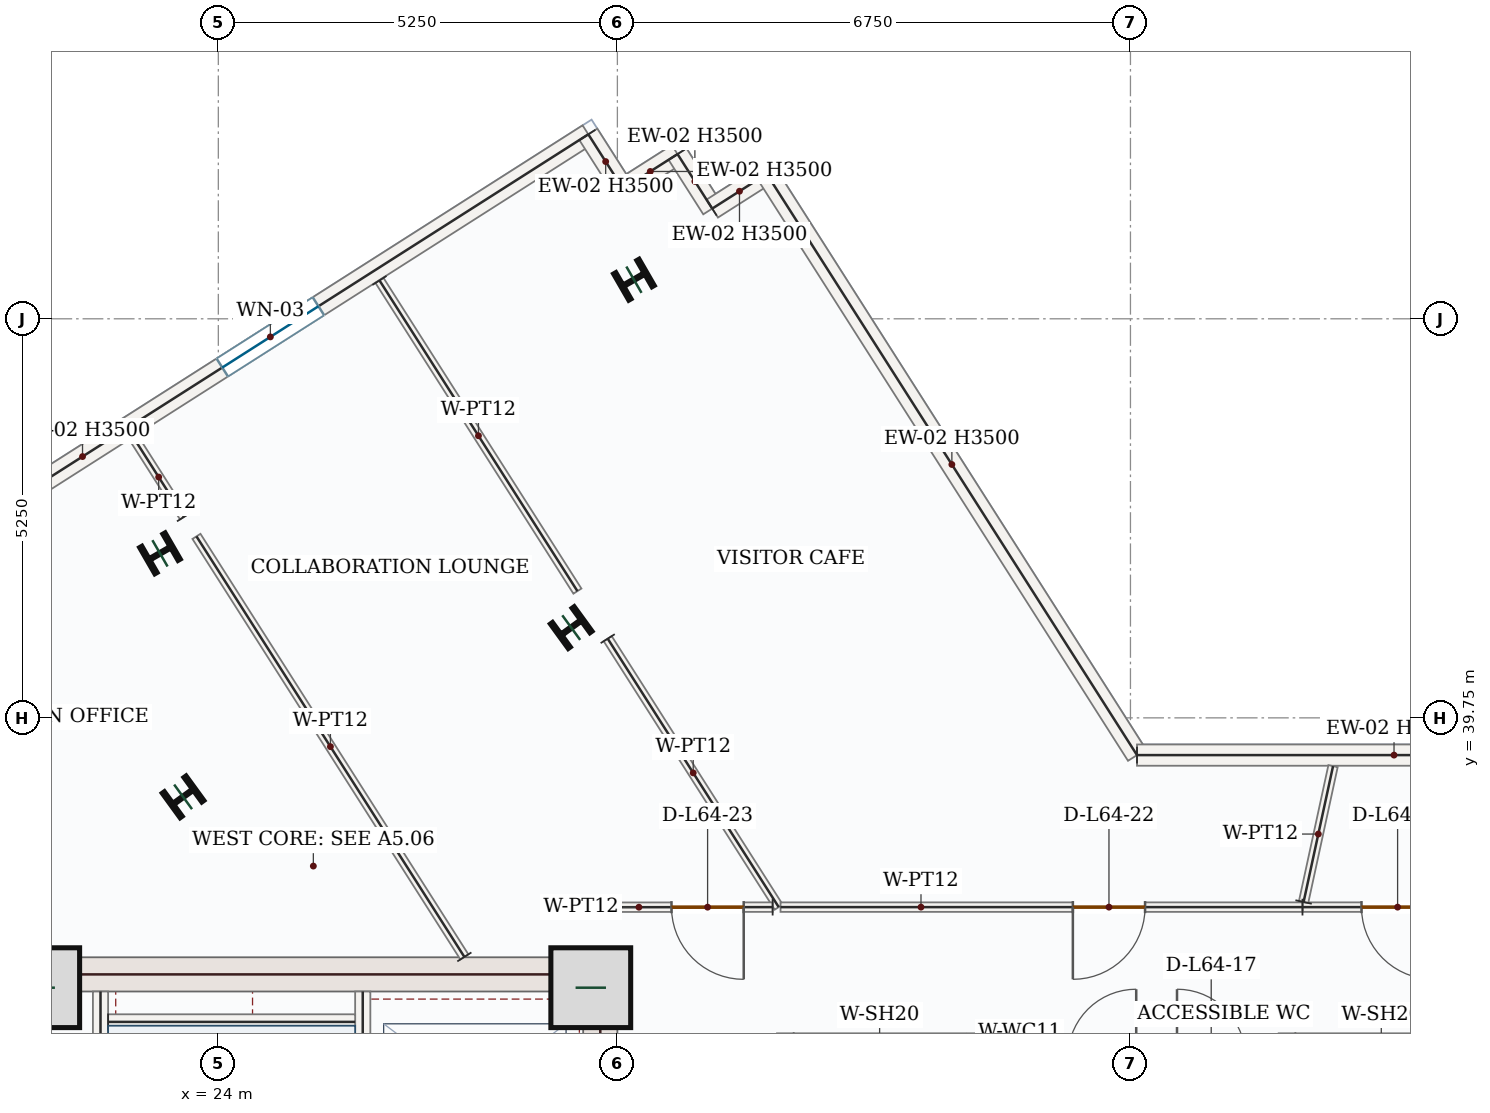
"""IFC4 building model, lengths in metres.
Left out: names, types, materials, properties, quantities, classifications, styles, units other than length and angle.
Written with IfcOpenShell. Run it as: python <this file> out.ifc"""

import sys

from ifc_helpers import new_model, si_unit, direction, frame, frame_2d, origin, origin_2d, place, context, subcontext, project, spatial, rectangle, i_section, extrude, source, transform, mapped, element, fill, save


model = new_model("IFC4")
c1 = context("Model", 3, precision=1e-05, world=origin(), true_north=direction((0.0, 1.0)))
c2 = subcontext(c1, "Body", "Model", "MODEL_VIEW")
j1 = project(units=[si_unit("LENGTHUNIT", "METRE"), si_unit("PLANEANGLEUNIT", "RADIAN")], contexts=[c1])
p1 = place(None, origin())
s1 = spatial("IfcSite", under=j1, at=p1, CompositionType="ELEMENT")
p2 = place(p1, origin())
s2 = spatial("IfcBuilding", under=s1, at=p2, CompositionType="ELEMENT")
p3 = place(p2, frame((0.0, 0.0, 269.1)))
s3 = spatial("IfcBuildingStorey", under=s2, at=p3, CompositionType="ELEMENT", Elevation=269.1)
p4 = place(p3, frame((29.025, 28.05, 0.0), z_axis=(0.0, 0.0, 1.0), x_axis=(0.0, 1.0, 0.0)))
e1 = element("IfcWall", 1, at=p4, inside=s3, PredefinedType="SHEAR", context=c2, shape_type="SweptSolid", body=[
    extrude(rectangle(XDim=8.55, YDim=0.45, at=frame_2d((4.275, 0.0))), origin(), (0.0, 0.0, 1.0), 3.5),
])
p5 = place(p4, frame((1.5, 0.0, 0.0)))
e2 = element("IfcOpeningElement", 2, at=p5, cuts=e1, PredefinedType="OPENING", context=c2, shape_type="SweptSolid", body=[
    extrude(rectangle(XDim=1.1, YDim=2.2, at=frame_2d((0.55, 1.1))), frame((0.0, 0.235, 0.0), z_axis=(0.0, -1.0, 0.0), x_axis=(1.0, 0.0, 0.0)), (0.0, 0.0, 1.0), 0.47),
])
m1 = source(origin(), c2, "Body", "SweptSolid", [
    extrude(rectangle(XDim=7.1, YDim=0.45, at=frame_2d((3.55, 0.0))), origin(), (0.0, 0.0, 1.0), 3.5),
])
p6 = place(p3, frame((21.7, 36.375, 0.0), z_axis=(0.0, 0.0, 1.0), x_axis=(1.0, 0.0, 0.0)))
e3 = element("IfcWall", 3, at=p6, inside=s3, PredefinedType="SHEAR", context=c2, shape_type="MappedRepresentation", body=[
    mapped(m1, transform((0.0, 0.0, 0.0), x_axis=(1.0, 0.0, 0.0), y_axis=(0.0, 1.0, 0.0), z_axis=(0.0, 0.0, 1.0), scale=1.0)),
])
m2 = source(origin(), c2, "Body", "SweptSolid", [
    extrude(rectangle(XDim=1.05, YDim=1.05, at=origin_2d()), origin(), (0.0, 0.0, 1.0), 3.75),
])
for number, where, z_axis, x_axis in (
    (4, (21.65, 36.2, 0.0), (0.0, 0.0, 1.0), (1.0, 0.0, 0.0)),
    (5, (28.9, 36.2, 0.0), (0.0, 0.0, 1.0), (1.0, 0.0, 0.0)),
):
    element("IfcColumn", number, at=place(p3, frame(where, z_axis=z_axis, x_axis=x_axis)), inside=s3, PredefinedType="COLUMN", context=c2, shape_type="MappedRepresentation", body=[
        mapped(m2, transform((0.0, 0.0, 0.0), x_axis=(1.0, 0.0, 0.0), y_axis=(0.0, 1.0, 0.0), z_axis=(0.0, 0.0, 1.0), scale=1.0)),
    ])
m3 = source(origin(), c2, "Body", "SweptSolid", [
    extrude(i_section(OverallWidth=0.399, OverallDepth=0.386, WebThickness=0.021, FlangeThickness=0.033, FilletRadius=0.018, at=origin_2d()), origin(), (0.0, 0.0, 1.0), 3.75),
])
for number, where, z_axis, x_axis in (
    (6, (28.643, 40.937, 0.0), (0.0, 0.0, 1.0), (-0.588, 0.809, 0.0)),
    (7, (23.536, 38.711, 0.0), (0.0, 0.0, 1.0), (-0.588, 0.809, 0.0)),
    (8, (29.468, 45.514, 0.0), (0.0, 0.0, 1.0), (-0.5, 0.866, 0.0)),
    (9, (23.232, 41.914, 0.0), (0.0, 0.0, 1.0), (-0.5, 0.866, 0.0)),
):
    element("IfcColumn", number, at=place(p3, frame(where, z_axis=z_axis, x_axis=x_axis)), inside=s3, PredefinedType="COLUMN", context=c2, shape_type="MappedRepresentation", body=[
        mapped(m3, transform((0.0, 0.0, 0.0), x_axis=(1.0, 0.0, 0.0), y_axis=(0.0, 1.0, 0.0), z_axis=(0.0, 0.0, 1.0), scale=1.0)),
    ])
p7 = place(p3, frame((20.501, 42.097, 0.0), z_axis=(0.0, 0.0, 1.0), x_axis=(0.843388777764, 0.537303796322, 0.0)))
e10 = element("IfcWall", 10, at=p7, inside=s3, PredefinedType="SOLIDWALL", context=c2, shape_type="SweptSolid", body=[
    extrude(rectangle(XDim=9.92, YDim=0.28, at=frame_2d((4.96, 0.0))), origin(), (0.0, 0.0, 1.0), 3.5),
])
p8 = place(p7, frame((4.21, 0.0, 0.85)))
e11 = element("IfcOpeningElement", 11, at=p8, cuts=e10, PredefinedType="OPENING", context=c2, shape_type="SweptSolid", body=[
    extrude(rectangle(XDim=1.5, YDim=1.5, at=frame_2d((0.75, 0.75))), frame((0.0, 0.15, 0.0), z_axis=(0.0, -1.0, 0.0), x_axis=(1.0, 0.0, 0.0)), (0.0, 0.0, 1.0), 0.3),
])
m4 = source(origin(), c2, "Body", "SweptSolid", [
    extrude(rectangle(XDim=0.85, YDim=0.28, at=frame_2d((0.425, 0.0))), origin(), (0.0, 0.0, 1.0), 3.5),
])
p9 = place(p3, frame((28.868, 47.427, 0.0), z_axis=(0.0, 0.0, 1.0), x_axis=(0.537210044462, -0.843448497615, 0.0)))
e12 = element("IfcWall", 12, at=p9, inside=s3, PredefinedType="SOLIDWALL", context=c2, shape_type="MappedRepresentation", body=[
    mapped(m4, transform((0.0, 0.0, 0.0), x_axis=(1.0, 0.0, 0.0), y_axis=(0.0, 1.0, 0.0), z_axis=(0.0, 0.0, 1.0), scale=1.0)),
])
m5 = source(origin(), c2, "Body", "SweptSolid", [
    extrude(rectangle(XDim=0.85, YDim=0.28, at=frame_2d((0.425, 0.0))), origin(), (0.0, 0.0, 1.0), 3.5),
])
p10 = place(p3, frame((29.324, 46.71, 0.0), z_axis=(0.0, 0.0, 1.0), x_axis=(0.843531374408, 0.537079901308, 0.0)))
e13 = element("IfcWall", 13, at=p10, inside=s3, PredefinedType="SOLIDWALL", context=c2, shape_type="MappedRepresentation", body=[
    mapped(m5, transform((0.0, 0.0, 0.0), x_axis=(1.0, 0.0, 0.0), y_axis=(0.0, 1.0, 0.0), z_axis=(0.0, 0.0, 1.0), scale=1.0)),
])
for number, where, z_axis, x_axis in (
    (14, (30.041, 47.167, 0.0), (0.0, 0.0, 1.0), (0.537, -0.843, 0.0)),
    (15, (30.498, 46.45, 0.0), (0.0, 0.0, 1.0), (0.843, 0.537, 0.0)),
):
    element("IfcWall", number, at=place(p3, frame(where, z_axis=z_axis, x_axis=x_axis)), inside=s3, PredefinedType="SOLIDWALL", context=c2, shape_type="MappedRepresentation", body=[
        mapped(m4, transform((0.0, 0.0, 0.0), x_axis=(1.0, 0.0, 0.0), y_axis=(0.0, 1.0, 0.0), z_axis=(0.0, 0.0, 1.0), scale=1.0)),
    ])
m6 = source(origin(), c2, "Body", "SweptSolid", [
    extrude(rectangle(XDim=9.066, YDim=0.28, at=frame_2d((4.533, 0.0))), origin(), (0.0, 0.0, 1.0), 3.5),
])
p11 = place(p3, frame((31.215, 46.906, 0.0), z_axis=(0.0, 0.0, 1.0), x_axis=(0.537298831286, -0.843391940855, 0.0)))
e16 = element("IfcWall", 16, at=p11, inside=s3, PredefinedType="SOLIDWALL", context=c2, shape_type="MappedRepresentation", body=[
    mapped(m6, transform((0.0, 0.0, 0.0), x_axis=(1.0, 0.0, 0.0), y_axis=(0.0, 1.0, 0.0), z_axis=(0.0, 0.0, 1.0), scale=1.0)),
])
m7 = source(origin(), c2, "Body", "SweptSolid", [
    extrude(rectangle(XDim=6.763, YDim=0.28, at=frame_2d((3.381, 0.0))), origin(), (0.0, 0.0, 1.0), 3.5),
])
p12 = place(p3, frame((36.086, 39.26, 0.0), z_axis=(0.0, 0.0, 1.0), x_axis=(1.0, 0.0, 0.0)))
e17 = element("IfcWall", 17, at=p12, inside=s3, PredefinedType="SOLIDWALL", context=c2, shape_type="MappedRepresentation", body=[
    mapped(m7, transform((0.0, 0.0, 0.0), x_axis=(1.0, 0.0, 0.0), y_axis=(0.0, 1.0, 0.0), z_axis=(0.0, 0.0, 1.0), scale=1.0)),
])
m8 = source(origin(), c2, "Body", "SweptSolid", [
    extrude(rectangle(XDim=7.87, YDim=0.2, at=frame_2d((3.935, 0.0))), origin(), (0.0, 0.0, 1.0), 3.5),
])
p13 = place(p3, frame((22.45, 28.28, 0.0), z_axis=(0.0, 0.0, 1.0), x_axis=(0.0, 1.0, 0.0)))
e18 = element("IfcWall", 18, at=p13, inside=s3, PredefinedType="SOLIDWALL", context=c2, shape_type="MappedRepresentation", body=[
    mapped(m8, transform((0.0, 0.0, 0.0), x_axis=(1.0, 0.0, 0.0), y_axis=(0.0, 1.0, 0.0), z_axis=(0.0, 0.0, 1.0), scale=1.0)),
])
p14 = place(p3, frame((25.9, 28.15, 0.0), z_axis=(0.0, 0.0, 1.0), x_axis=(0.0, 1.0, 0.0)))
e19 = element("IfcWall", 19, at=p14, inside=s3, PredefinedType="SOLIDWALL", context=c2, shape_type="SweptSolid", body=[
    extrude(rectangle(XDim=8.0, YDim=0.2, at=frame_2d((4.0, 0.0))), origin(), (0.0, 0.0, 1.0), 3.5),
])
p15 = place(p14, frame((0.4, 0.0, 0.0)))
e20 = element("IfcOpeningElement", 20, at=p15, cuts=e19, PredefinedType="OPENING", context=c2, shape_type="SweptSolid", body=[
    extrude(rectangle(XDim=1.05, YDim=2.15, at=frame_2d((0.525, 1.075))), frame((0.0, 0.11, 0.0), z_axis=(0.0, -1.0, 0.0), x_axis=(1.0, 0.0, 0.0)), (0.0, 0.0, 1.0), 0.22),
])
m9 = source(origin(), c2, "Body", "SweptSolid", [
    extrude(rectangle(XDim=3.25, YDim=0.2, at=frame_2d((1.625, 0.0))), origin(), (0.0, 0.0, 1.0), 3.5),
])
p16 = place(p3, frame((22.55, 35.75, 0.0), z_axis=(0.0, 0.0, 1.0), x_axis=(1.0, 0.0, 0.0)))
e21 = element("IfcWall", 21, at=p16, inside=s3, PredefinedType="SOLIDWALL", context=c2, shape_type="MappedRepresentation", body=[
    mapped(m9, transform((0.0, 0.0, 0.0), x_axis=(1.0, 0.0, 0.0), y_axis=(0.0, 1.0, 0.0), z_axis=(0.0, 0.0, 1.0), scale=1.0)),
])
p17 = place(p3, frame((31.45, 33.2, 0.0), z_axis=(0.0, 0.0, 1.0), x_axis=(0.0, 1.0, 0.0)))
e22 = element("IfcWall", 22, at=p17, inside=s3, PredefinedType="SOLIDWALL", context=c2, shape_type="SweptSolid", body=[
    extrude(rectangle(XDim=2.4, YDim=0.2, at=frame_2d((1.2, 0.0))), origin(), (0.0, 0.0, 1.0), 3.5),
])
p18 = place(p17, frame((0.65, 0.0, 0.0)))
e23 = element("IfcOpeningElement", 23, at=p18, cuts=e22, PredefinedType="OPENING", context=c2, shape_type="SweptSolid", body=[
    extrude(rectangle(XDim=1.1, YDim=2.15, at=frame_2d((0.55, 1.075))), frame((0.0, 0.11, 0.0), z_axis=(0.0, -1.0, 0.0), x_axis=(1.0, 0.0, 0.0)), (0.0, 0.0, 1.0), 0.22),
])
m10 = source(origin(), c2, "Body", "SweptSolid", [
    extrude(rectangle(XDim=2.4, YDim=0.2, at=frame_2d((1.2, 0.0))), origin(), (0.0, 0.0, 1.0), 3.5),
])
for number, where, z_axis, x_axis in (
    (24, (33.95, 33.2, 0.0), (0.0, 0.0, 1.0), (0.0, 1.0, 0.0)),
    (25, (38.05, 33.2, 0.0), (0.0, 0.0, 1.0), (0.0, 1.0, 0.0)),
):
    element("IfcWall", number, at=place(p3, frame(where, z_axis=z_axis, x_axis=x_axis)), inside=s3, PredefinedType="SOLIDWALL", context=c2, shape_type="MappedRepresentation", body=[
        mapped(m10, transform((0.0, 0.0, 0.0), x_axis=(1.0, 0.0, 0.0), y_axis=(0.0, 1.0, 0.0), z_axis=(0.0, 0.0, 1.0), scale=1.0)),
    ])
m11 = source(origin(), c2, "Body", "SweptSolid", [
    extrude(rectangle(XDim=4.188, YDim=0.125, at=frame_2d((2.094, 0.0))), origin(), (0.0, 0.0, 1.0), 3.5),
])
p19 = place(p3, frame((29.123, 40.792, 0.0), z_axis=(0.0, 0.0, 1.0), x_axis=(0.537264008944, -0.843414124078, 0.0)))
e26 = element("IfcWall", 26, at=p19, inside=s3, PredefinedType="PARTITIONING", context=c2, shape_type="MappedRepresentation", body=[
    mapped(m11, transform((0.0, 0.0, 0.0), x_axis=(1.0, 0.0, 0.0), y_axis=(0.0, 1.0, 0.0), z_axis=(0.0, 0.0, 1.0), scale=1.0)),
])
p20 = place(p3, frame((31.292, 37.26, 0.0), z_axis=(0.0, 0.0, 1.0), x_axis=(-0.999999820546, -0.000599089277, 0.0)))
e27 = element("IfcWall", 27, at=p20, inside=s3, PredefinedType="PARTITIONING", context=c2, shape_type="SweptSolid", body=[
    extrude(rectangle(XDim=2.038, YDim=0.125, at=frame_2d((1.019, 0.0))), origin(), (0.0, 0.0, 1.0), 3.5),
])
p21 = place(p20, frame((0.381, 0.0, 0.0)))
e28 = element("IfcOpeningElement", 28, at=p21, cuts=e27, PredefinedType="OPENING", context=c2, shape_type="SweptSolid", body=[
    extrude(rectangle(XDim=0.95, YDim=2.15, at=frame_2d((0.475, 1.075))), frame((0.0, 0.073, 0.0), z_axis=(0.0, -1.0, 0.0), x_axis=(1.0, 0.0, 0.0)), (0.0, 0.0, 1.0), 0.145),
])
m12 = source(origin(), c2, "Body", "SweptSolid", [
    extrude(rectangle(XDim=6.56, YDim=0.125, at=frame_2d((3.28, 0.0))), origin(), (0.0, 0.0, 1.0), 3.5),
])
p22 = place(p3, frame((27.237, 36.605, 0.0), z_axis=(0.0, 0.0, 1.0), x_axis=(-0.537282422054, 0.843402394443, 0.0)))
e29 = element("IfcWall", 29, at=p22, inside=s3, PredefinedType="PARTITIONING", context=c2, shape_type="MappedRepresentation", body=[
    mapped(m12, transform((0.0, 0.0, 0.0), x_axis=(1.0, 0.0, 0.0), y_axis=(0.0, 1.0, 0.0), z_axis=(0.0, 0.0, 1.0), scale=1.0)),
])
m13 = source(origin(), c2, "Body", "SweptSolid", [
    extrude(rectangle(XDim=1.241, YDim=0.125, at=frame_2d((0.621, 0.0))), origin(), (0.0, 0.0, 1.0), 3.5),
])
p23 = place(p3, frame((23.549, 42.394, 0.0), z_axis=(0.0, 0.0, 1.0), x_axis=(-0.537244446477, 0.843426585264, 0.0)))
e30 = element("IfcWall", 30, at=p23, inside=s3, PredefinedType="PARTITIONING", context=c2, shape_type="MappedRepresentation", body=[
    mapped(m13, transform((0.0, 0.0, 0.0), x_axis=(1.0, 0.0, 0.0), y_axis=(0.0, 1.0, 0.0), z_axis=(0.0, 0.0, 1.0), scale=1.0)),
])
m14 = source(origin(), c2, "Body", "SweptSolid", [
    extrude(rectangle(XDim=4.846, YDim=0.125, at=frame_2d((2.423, 0.0))), origin(), (0.0, 0.0, 1.0), 3.5),
])
p24 = place(p3, frame((26.12, 45.505, 0.0), z_axis=(0.0, 0.0, 1.0), x_axis=(0.537305688893, -0.843387572047, 0.0)))
e31 = element("IfcWall", 31, at=p24, inside=s3, PredefinedType="PARTITIONING", context=c2, shape_type="MappedRepresentation", body=[
    mapped(m14, transform((0.0, 0.0, 0.0), x_axis=(1.0, 0.0, 0.0), y_axis=(0.0, 1.0, 0.0), z_axis=(0.0, 0.0, 1.0), scale=1.0)),
])
p25 = place(p3, frame((42.742, 37.26, 0.0), z_axis=(0.0, 0.0, 1.0), x_axis=(-0.999999998515, 5.4504824e-05, 0.0)))
e32 = element("IfcWall", 32, at=p25, inside=s3, PredefinedType="PARTITIONING", context=c2, shape_type="SweptSolid", body=[
    extrude(rectangle(XDim=4.479, YDim=0.125, at=frame_2d((2.24, 0.0))), origin(), (0.0, 0.0, 1.0), 3.5),
])
p26 = place(p25, frame((2.753, 0.0, 0.0)))
e33 = element("IfcOpeningElement", 33, at=p26, cuts=e32, PredefinedType="OPENING", context=c2, shape_type="SweptSolid", body=[
    extrude(rectangle(XDim=0.95, YDim=2.15, at=frame_2d((0.475, 1.075))), frame((0.0, 0.073, 0.0), z_axis=(0.0, -1.0, 0.0), x_axis=(1.0, 0.0, 0.0)), (0.0, 0.0, 1.0), 0.145),
])
m15 = source(origin(), c2, "Body", "SweptSolid", [
    extrude(rectangle(XDim=1.829, YDim=0.125, at=frame_2d((0.915, 0.0))), origin(), (0.0, 0.0, 1.0), 3.5),
])
p27 = place(p3, frame((38.278, 37.327, 0.0), z_axis=(0.0, 0.0, 1.0), x_axis=(0.21182559105, 0.977307484355, 0.0)))
e34 = element("IfcWall", 34, at=p27, inside=s3, PredefinedType="PARTITIONING", context=c2, shape_type="MappedRepresentation", body=[
    mapped(m15, transform((0.0, 0.0, 0.0), x_axis=(1.0, 0.0, 0.0), y_axis=(0.0, 1.0, 0.0), z_axis=(0.0, 0.0, 1.0), scale=1.0)),
])
p28 = place(p3, frame((38.263, 37.26, 0.0), z_axis=(0.0, 0.0, 1.0), x_axis=(-1.0, 0.0, 0.0)))
e35 = element("IfcWall", 35, at=p28, inside=s3, PredefinedType="PARTITIONING", context=c2, shape_type="SweptSolid", body=[
    extrude(rectangle(XDim=6.867, YDim=0.125, at=frame_2d((3.434, 0.0))), origin(), (0.0, 0.0, 1.0), 3.5),
])
p29 = place(p28, frame((2.071, 0.0, 0.0)))
e36 = element("IfcOpeningElement", 36, at=p29, cuts=e35, PredefinedType="OPENING", context=c2, shape_type="SweptSolid", body=[
    extrude(rectangle(XDim=0.95, YDim=2.15, at=frame_2d((0.475, 1.075))), frame((0.0, 0.073, 0.0), z_axis=(0.0, -1.0, 0.0), x_axis=(1.0, 0.0, 0.0)), (0.0, 0.0, 1.0), 0.145),
])
m16 = source(origin(), c2, "Body", "SweptSolid", [
    extrude(rectangle(XDim=1.5, YDim=1.5, at=frame_2d((0.75, 0.75))), frame((0.0, 0.03, 0.0), z_axis=(0.0, -1.0, 0.0), x_axis=(1.0, 0.0, 0.0)), (0.0, 0.0, 1.0), 0.06),
])
p30 = place(p8, origin())
e37 = element("IfcWindow", 37, at=p30, inside=s3, PartitioningType="SINGLE_PANEL", PredefinedType="WINDOW", context=c2, shape_type="MappedRepresentation", body=[
    mapped(m16, transform((0.0, 0.0, 0.0), x_axis=(1.0, 0.0, 0.0), y_axis=(0.0, 1.0, 0.0), z_axis=(0.0, 0.0, 1.0), scale=1.0)),
])
fill(e11, e37)
m17 = source(origin(), c2, "Body", "SweptSolid", [
    extrude(rectangle(XDim=0.95, YDim=2.15, at=frame_2d((0.475, 1.075))), frame((0.0, 0.025, 0.0), z_axis=(0.0, -1.0, 0.0), x_axis=(1.0, 0.0, 0.0)), (0.0, 0.0, 1.0), 0.05),
])
p31 = place(p26, origin())
e38 = element("IfcDoor", 38, at=p31, inside=s3, OperationType="SINGLE_SWING_LEFT", PredefinedType="DOOR", context=c2, shape_type="MappedRepresentation", body=[
    mapped(m17, transform((0.0, 0.0, 0.0), x_axis=(1.0, 0.0, 0.0), y_axis=(0.0, 1.0, 0.0), z_axis=(0.0, 0.0, 1.0), scale=1.0)),
])
fill(e33, e38)
p32 = place(p29, origin())
e39 = element("IfcDoor", 39, at=p32, inside=s3, OperationType="SINGLE_SWING_RIGHT", PredefinedType="DOOR", context=c2, shape_type="MappedRepresentation", body=[
    mapped(m17, transform((0.0, 0.0, 0.0), x_axis=(1.0, 0.0, 0.0), y_axis=(0.0, 1.0, 0.0), z_axis=(0.0, 0.0, 1.0), scale=1.0)),
])
fill(e36, e39)
p33 = place(p21, origin())
e40 = element("IfcDoor", 40, at=p33, inside=s3, OperationType="SINGLE_SWING_LEFT", PredefinedType="DOOR", context=c2, shape_type="MappedRepresentation", body=[
    mapped(m17, transform((0.0, 0.0, 0.0), x_axis=(1.0, 0.0, 0.0), y_axis=(0.0, 1.0, 0.0), z_axis=(0.0, 0.0, 1.0), scale=1.0)),
])
fill(e28, e40)
save(model, sys.argv[1])
